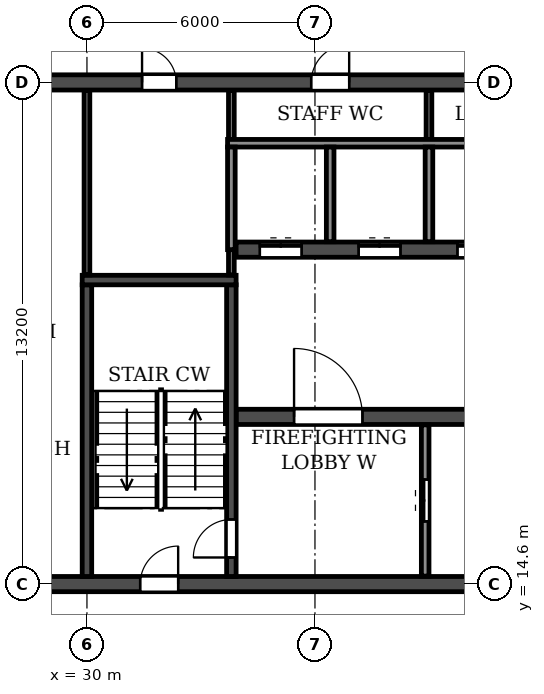
"""IFC4 building model, lengths in metres.
Left out: names, types, materials, properties, quantities, classifications, styles, units other than length and angle.
Written with IfcOpenShell. Run it as: python <this file> out.ifc"""

import sys

from ifc_helpers import new_model, si_unit, direction, frame, frame_2d, origin, place, context, subcontext, project, spatial, rectangle, extrude, element, fill, save


model = new_model("IFC4")
c1 = context("Model", 3, precision=1e-05, world=origin(), true_north=direction((0.0, 1.0)))
c2 = subcontext(c1, "Body", "Model", "MODEL_VIEW")
j1 = project(units=[si_unit("LENGTHUNIT", "METRE"), si_unit("PLANEANGLEUNIT", "RADIAN")], contexts=[c1])
p1 = place(None, origin())
s1 = spatial("IfcSite", under=j1, at=p1, CompositionType="ELEMENT")
p2 = place(p1, origin())
s2 = spatial("IfcBuilding", under=s1, at=p2, CompositionType="ELEMENT")
p3 = place(p2, frame((0.0, 0.0, 171.9)))
s3 = spatial("IfcBuildingStorey", under=s2, at=p3, CompositionType="ELEMENT", Elevation=171.9)
p4 = place(p3, frame((18.2, 14.6, 0.0), z_axis=(0.0, 0.0, 1.0), x_axis=(1.0, 0.0, 0.0)))
e1 = element("IfcWall", 1, at=p4, inside=s3, PredefinedType="SOLIDWALL", context=c2, shape_type="SweptSolid", body=[
    extrude(rectangle(XDim=65.6, YDim=0.4, at=frame_2d((32.8, 0.0))), origin(), (0.0, 0.0, 1.0), 3.08),
])
p5 = place(p4, frame((0.7, 0.0, 0.0)))
e2 = element("IfcOpeningElement", 2, at=p5, cuts=e1, PredefinedType="OPENING", context=c2, shape_type="SweptSolid", body=[
    extrude(rectangle(XDim=1.0, YDim=2.1, at=frame_2d((0.5, 1.05))), frame((0.0, 0.21, 0.0), z_axis=(0.0, -1.0, 0.0), x_axis=(1.0, 0.0, 0.0)), (0.0, 0.0, 1.0), 0.42),
])
p6 = place(p4, frame((8.6, 0.0, 0.0)))
e3 = element("IfcOpeningElement", 3, at=p6, cuts=e1, PredefinedType="OPENING", context=c2, shape_type="SweptSolid", body=[
    extrude(rectangle(XDim=1.0, YDim=2.1, at=frame_2d((0.5, 1.05))), frame((0.0, 0.21, 0.0), z_axis=(0.0, -1.0, 0.0), x_axis=(1.0, 0.0, 0.0)), (0.0, 0.0, 1.0), 0.42),
])
p7 = place(p4, frame((13.2, 0.0, 0.0)))
e4 = element("IfcOpeningElement", 4, at=p7, cuts=e1, PredefinedType="OPENING", context=c2, shape_type="SweptSolid", body=[
    extrude(rectangle(XDim=1.0, YDim=2.1, at=frame_2d((0.5, 1.05))), frame((0.0, 0.21, 0.0), z_axis=(0.0, -1.0, 0.0), x_axis=(1.0, 0.0, 0.0)), (0.0, 0.0, 1.0), 0.42),
])
p8 = place(p4, frame((25.8, 0.0, 0.0)))
e5 = element("IfcOpeningElement", 5, at=p8, cuts=e1, PredefinedType="OPENING", context=c2, shape_type="SweptSolid", body=[
    extrude(rectangle(XDim=1.0, YDim=2.1, at=frame_2d((0.5, 1.05))), frame((0.0, 0.21, 0.0), z_axis=(0.0, -1.0, 0.0), x_axis=(1.0, 0.0, 0.0)), (0.0, 0.0, 1.0), 0.42),
])
p9 = place(p4, frame((29.7, 0.0, 0.0)))
e6 = element("IfcOpeningElement", 6, at=p9, cuts=e1, PredefinedType="OPENING", context=c2, shape_type="SweptSolid", body=[
    extrude(rectangle(XDim=1.0, YDim=2.1, at=frame_2d((0.5, 1.05))), frame((0.0, 0.21, 0.0), z_axis=(0.0, -1.0, 0.0), x_axis=(1.0, 0.0, 0.0)), (0.0, 0.0, 1.0), 0.42),
])
p10 = place(p4, frame((32.3, 0.0, 0.0)))
e7 = element("IfcOpeningElement", 7, at=p10, cuts=e1, PredefinedType="OPENING", context=c2, shape_type="SweptSolid", body=[
    extrude(rectangle(XDim=1.0, YDim=2.1, at=frame_2d((0.5, 1.05))), frame((0.0, 0.21, 0.0), z_axis=(0.0, -1.0, 0.0), x_axis=(1.0, 0.0, 0.0)), (0.0, 0.0, 1.0), 0.42),
])
p11 = place(p4, frame((37.5, 0.0, 0.0)))
e8 = element("IfcOpeningElement", 8, at=p11, cuts=e1, PredefinedType="OPENING", context=c2, shape_type="SweptSolid", body=[
    extrude(rectangle(XDim=1.0, YDim=2.1, at=frame_2d((0.5, 1.05))), frame((0.0, 0.21, 0.0), z_axis=(0.0, -1.0, 0.0), x_axis=(1.0, 0.0, 0.0)), (0.0, 0.0, 1.0), 0.42),
])
p12 = place(p4, frame((51.4, 0.0, 0.0)))
e9 = element("IfcOpeningElement", 9, at=p12, cuts=e1, PredefinedType="OPENING", context=c2, shape_type="SweptSolid", body=[
    extrude(rectangle(XDim=1.0, YDim=2.1, at=frame_2d((0.5, 1.05))), frame((0.0, 0.21, 0.0), z_axis=(0.0, -1.0, 0.0), x_axis=(1.0, 0.0, 0.0)), (0.0, 0.0, 1.0), 0.42),
])
p13 = place(p4, frame((56.0, 0.0, 0.0)))
e10 = element("IfcOpeningElement", 10, at=p13, cuts=e1, PredefinedType="OPENING", context=c2, shape_type="SweptSolid", body=[
    extrude(rectangle(XDim=1.0, YDim=2.1, at=frame_2d((0.5, 1.05))), frame((0.0, 0.21, 0.0), z_axis=(0.0, -1.0, 0.0), x_axis=(1.0, 0.0, 0.0)), (0.0, 0.0, 1.0), 0.42),
])
p14 = place(p4, frame((63.9, 0.0, 0.0)))
e11 = element("IfcOpeningElement", 11, at=p14, cuts=e1, PredefinedType="OPENING", context=c2, shape_type="SweptSolid", body=[
    extrude(rectangle(XDim=1.0, YDim=2.1, at=frame_2d((0.5, 1.05))), frame((0.0, 0.21, 0.0), z_axis=(0.0, -1.0, 0.0), x_axis=(1.0, 0.0, 0.0)), (0.0, 0.0, 1.0), 0.42),
])
p15 = place(p3, frame((18.2, 27.8, 0.0), z_axis=(0.0, 0.0, 1.0), x_axis=(1.0, 0.0, 0.0)))
e12 = element("IfcWall", 12, at=p15, inside=s3, PredefinedType="SOLIDWALL", context=c2, shape_type="SweptSolid", body=[
    extrude(rectangle(XDim=65.6, YDim=0.4, at=frame_2d((32.8, 0.0))), origin(), (0.0, 0.0, 1.0), 3.08),
])
p16 = place(p15, frame((0.7, 0.0, 0.0)))
e13 = element("IfcOpeningElement", 13, at=p16, cuts=e12, PredefinedType="OPENING", context=c2, shape_type="SweptSolid", body=[
    extrude(rectangle(XDim=1.0, YDim=2.1, at=frame_2d((0.5, 1.05))), frame((0.0, 0.21, 0.0), z_axis=(0.0, -1.0, 0.0), x_axis=(1.0, 0.0, 0.0)), (0.0, 0.0, 1.0), 0.42),
])
p17 = place(p15, frame((4.05, 0.0, 0.0)))
e14 = element("IfcOpeningElement", 14, at=p17, cuts=e12, PredefinedType="OPENING", context=c2, shape_type="SweptSolid", body=[
    extrude(rectangle(XDim=0.9, YDim=2.1, at=frame_2d((0.45, 1.05))), frame((0.0, 0.21, 0.0), z_axis=(0.0, -1.0, 0.0), x_axis=(1.0, 0.0, 0.0)), (0.0, 0.0, 1.0), 0.42),
])
p18 = place(p15, frame((13.25, 0.0, 0.0)))
e15 = element("IfcOpeningElement", 15, at=p18, cuts=e12, PredefinedType="OPENING", context=c2, shape_type="SweptSolid", body=[
    extrude(rectangle(XDim=0.9, YDim=2.1, at=frame_2d((0.45, 1.05))), frame((0.0, 0.21, 0.0), z_axis=(0.0, -1.0, 0.0), x_axis=(1.0, 0.0, 0.0)), (0.0, 0.0, 1.0), 0.42),
])
p19 = place(p15, frame((17.7, 0.0, 0.0)))
e16 = element("IfcOpeningElement", 16, at=p19, cuts=e12, PredefinedType="OPENING", context=c2, shape_type="SweptSolid", body=[
    extrude(rectangle(XDim=1.0, YDim=2.1, at=frame_2d((0.5, 1.05))), frame((0.0, 0.21, 0.0), z_axis=(0.0, -1.0, 0.0), x_axis=(1.0, 0.0, 0.0)), (0.0, 0.0, 1.0), 0.42),
])
p20 = place(p15, frame((22.9, 0.0, 0.0)))
e17 = element("IfcOpeningElement", 17, at=p20, cuts=e12, PredefinedType="OPENING", context=c2, shape_type="SweptSolid", body=[
    extrude(rectangle(XDim=1.0, YDim=2.1, at=frame_2d((0.5, 1.05))), frame((0.0, 0.21, 0.0), z_axis=(0.0, -1.0, 0.0), x_axis=(1.0, 0.0, 0.0)), (0.0, 0.0, 1.0), 0.42),
])
p21 = place(p15, frame((29.4, 0.0, 0.0)))
e18 = element("IfcOpeningElement", 18, at=p21, cuts=e12, PredefinedType="OPENING", context=c2, shape_type="SweptSolid", body=[
    extrude(rectangle(XDim=1.0, YDim=2.1, at=frame_2d((0.5, 1.05))), frame((0.0, 0.21, 0.0), z_axis=(0.0, -1.0, 0.0), x_axis=(1.0, 0.0, 0.0)), (0.0, 0.0, 1.0), 0.42),
])
p22 = place(p15, frame((32.3, 0.0, 0.0)))
e19 = element("IfcOpeningElement", 19, at=p22, cuts=e12, PredefinedType="OPENING", context=c2, shape_type="SweptSolid", body=[
    extrude(rectangle(XDim=1.0, YDim=2.1, at=frame_2d((0.5, 1.05))), frame((0.0, 0.21, 0.0), z_axis=(0.0, -1.0, 0.0), x_axis=(1.0, 0.0, 0.0)), (0.0, 0.0, 1.0), 0.42),
])
p23 = place(p15, frame((36.5, 0.0, 0.0)))
e20 = element("IfcOpeningElement", 20, at=p23, cuts=e12, PredefinedType="OPENING", context=c2, shape_type="SweptSolid", body=[
    extrude(rectangle(XDim=1.0, YDim=2.1, at=frame_2d((0.5, 1.05))), frame((0.0, 0.21, 0.0), z_axis=(0.0, -1.0, 0.0), x_axis=(1.0, 0.0, 0.0)), (0.0, 0.0, 1.0), 0.42),
])
p24 = place(p15, frame((41.7, 0.0, 0.0)))
e21 = element("IfcOpeningElement", 21, at=p24, cuts=e12, PredefinedType="OPENING", context=c2, shape_type="SweptSolid", body=[
    extrude(rectangle(XDim=1.0, YDim=2.1, at=frame_2d((0.5, 1.05))), frame((0.0, 0.21, 0.0), z_axis=(0.0, -1.0, 0.0), x_axis=(1.0, 0.0, 0.0)), (0.0, 0.0, 1.0), 0.42),
])
p25 = place(p15, frame((45.6, 0.0, 0.0)))
e22 = element("IfcOpeningElement", 22, at=p25, cuts=e12, PredefinedType="OPENING", context=c2, shape_type="SweptSolid", body=[
    extrude(rectangle(XDim=1.0, YDim=2.1, at=frame_2d((0.5, 1.05))), frame((0.0, 0.21, 0.0), z_axis=(0.0, -1.0, 0.0), x_axis=(1.0, 0.0, 0.0)), (0.0, 0.0, 1.0), 0.42),
])
p26 = place(p15, frame((48.2, 0.0, 0.0)))
e23 = element("IfcOpeningElement", 23, at=p26, cuts=e12, PredefinedType="OPENING", context=c2, shape_type="SweptSolid", body=[
    extrude(rectangle(XDim=1.0, YDim=2.1, at=frame_2d((0.5, 1.05))), frame((0.0, 0.21, 0.0), z_axis=(0.0, -1.0, 0.0), x_axis=(1.0, 0.0, 0.0)), (0.0, 0.0, 1.0), 0.42),
])
p27 = place(p15, frame((51.45, 0.0, 0.0)))
e24 = element("IfcOpeningElement", 24, at=p27, cuts=e12, PredefinedType="OPENING", context=c2, shape_type="SweptSolid", body=[
    extrude(rectangle(XDim=0.9, YDim=2.1, at=frame_2d((0.45, 1.05))), frame((0.0, 0.21, 0.0), z_axis=(0.0, -1.0, 0.0), x_axis=(1.0, 0.0, 0.0)), (0.0, 0.0, 1.0), 0.42),
])
p28 = place(p15, frame((60.65, 0.0, 0.0)))
e25 = element("IfcOpeningElement", 25, at=p28, cuts=e12, PredefinedType="OPENING", context=c2, shape_type="SweptSolid", body=[
    extrude(rectangle(XDim=0.9, YDim=2.1, at=frame_2d((0.45, 1.05))), frame((0.0, 0.21, 0.0), z_axis=(0.0, -1.0, 0.0), x_axis=(1.0, 0.0, 0.0)), (0.0, 0.0, 1.0), 0.42),
])
p29 = place(p15, frame((63.9, 0.0, 0.0)))
e26 = element("IfcOpeningElement", 26, at=p29, cuts=e12, PredefinedType="OPENING", context=c2, shape_type="SweptSolid", body=[
    extrude(rectangle(XDim=1.0, YDim=2.1, at=frame_2d((0.5, 1.05))), frame((0.0, 0.21, 0.0), z_axis=(0.0, -1.0, 0.0), x_axis=(1.0, 0.0, 0.0)), (0.0, 0.0, 1.0), 0.42),
])
p30 = place(p3, frame((33.925, 19.0, 0.0), z_axis=(0.0, 0.0, 1.0), x_axis=(1.0, 0.0, 0.0)))
e27 = element("IfcWall", 27, at=p30, inside=s3, PredefinedType="SOLIDWALL", context=c2, shape_type="SweptSolid", body=[
    extrude(rectangle(XDim=34.15, YDim=0.4, at=frame_2d((17.075, 0.0))), origin(), (0.0, 0.0, 1.0), 3.08),
])
p31 = place(p30, frame((16.175, 0.0, 0.0)))
e28 = element("IfcOpeningElement", 28, at=p31, cuts=e27, PredefinedType="OPENING", context=c2, shape_type="SweptSolid", body=[
    extrude(rectangle(XDim=1.8, YDim=2.1, at=frame_2d((0.9, 1.05))), frame((0.0, 0.21, 0.0), z_axis=(0.0, -1.0, 0.0), x_axis=(1.0, 0.0, 0.0)), (0.0, 0.0, 1.0), 0.42),
])
p32 = place(p30, frame((1.525, 0.0, 0.0)))
e29 = element("IfcOpeningElement", 29, at=p32, cuts=e27, PredefinedType="OPENING", context=c2, shape_type="SweptSolid", body=[
    extrude(rectangle(XDim=1.8, YDim=2.1, at=frame_2d((0.9, 1.05))), frame((0.0, 0.21, 0.0), z_axis=(0.0, -1.0, 0.0), x_axis=(1.0, 0.0, 0.0)), (0.0, 0.0, 1.0), 0.42),
])
p33 = place(p30, frame((30.825, 0.0, 0.0)))
e30 = element("IfcOpeningElement", 30, at=p33, cuts=e27, PredefinedType="OPENING", context=c2, shape_type="SweptSolid", body=[
    extrude(rectangle(XDim=1.8, YDim=2.1, at=frame_2d((0.9, 1.05))), frame((0.0, 0.21, 0.0), z_axis=(0.0, -1.0, 0.0), x_axis=(1.0, 0.0, 0.0)), (0.0, 0.0, 1.0), 0.42),
])
p34 = place(p3, frame((33.925, 23.4, 0.0), z_axis=(0.0, 0.0, 1.0), x_axis=(1.0, 0.0, 0.0)))
e31 = element("IfcWall", 31, at=p34, inside=s3, PredefinedType="SOLIDWALL", context=c2, shape_type="SweptSolid", body=[
    extrude(rectangle(XDim=34.15, YDim=0.4, at=frame_2d((17.075, 0.0))), origin(), (0.0, 0.0, 1.0), 3.08),
])
p35 = place(p34, frame((16.175, 0.0, 0.0)))
e32 = element("IfcOpeningElement", 32, at=p35, cuts=e31, PredefinedType="OPENING", context=c2, shape_type="SweptSolid", body=[
    extrude(rectangle(XDim=1.8, YDim=2.1, at=frame_2d((0.9, 1.05))), frame((0.0, 0.21, 0.0), z_axis=(0.0, -1.0, 0.0), x_axis=(1.0, 0.0, 0.0)), (0.0, 0.0, 1.0), 0.42),
])
p36 = place(p34, frame((0.625, 0.0, 0.0)))
e33 = element("IfcOpeningElement", 33, at=p36, cuts=e31, PredefinedType="OPENING", context=c2, shape_type="SweptSolid", body=[
    extrude(rectangle(XDim=1.1, YDim=2.1, at=frame_2d((0.55, 1.05))), frame((0.0, 0.21, 0.0), z_axis=(0.0, -1.0, 0.0), x_axis=(1.0, 0.0, 0.0)), (0.0, 0.0, 1.0), 0.42),
])
p37 = place(p34, frame((3.225, 0.0, 0.0)))
e34 = element("IfcOpeningElement", 34, at=p37, cuts=e31, PredefinedType="OPENING", context=c2, shape_type="SweptSolid", body=[
    extrude(rectangle(XDim=1.1, YDim=2.1, at=frame_2d((0.55, 1.05))), frame((0.0, 0.21, 0.0), z_axis=(0.0, -1.0, 0.0), x_axis=(1.0, 0.0, 0.0)), (0.0, 0.0, 1.0), 0.42),
])
p38 = place(p34, frame((5.825, 0.0, 0.0)))
e35 = element("IfcOpeningElement", 35, at=p38, cuts=e31, PredefinedType="OPENING", context=c2, shape_type="SweptSolid", body=[
    extrude(rectangle(XDim=1.1, YDim=2.1, at=frame_2d((0.55, 1.05))), frame((0.0, 0.21, 0.0), z_axis=(0.0, -1.0, 0.0), x_axis=(1.0, 0.0, 0.0)), (0.0, 0.0, 1.0), 0.42),
])
p39 = place(p34, frame((8.425, 0.0, 0.0)))
e36 = element("IfcOpeningElement", 36, at=p39, cuts=e31, PredefinedType="OPENING", context=c2, shape_type="SweptSolid", body=[
    extrude(rectangle(XDim=1.1, YDim=2.1, at=frame_2d((0.55, 1.05))), frame((0.0, 0.21, 0.0), z_axis=(0.0, -1.0, 0.0), x_axis=(1.0, 0.0, 0.0)), (0.0, 0.0, 1.0), 0.42),
])
p40 = place(p34, frame((11.025, 0.0, 0.0)))
e37 = element("IfcOpeningElement", 37, at=p40, cuts=e31, PredefinedType="OPENING", context=c2, shape_type="SweptSolid", body=[
    extrude(rectangle(XDim=1.1, YDim=2.1, at=frame_2d((0.55, 1.05))), frame((0.0, 0.21, 0.0), z_axis=(0.0, -1.0, 0.0), x_axis=(1.0, 0.0, 0.0)), (0.0, 0.0, 1.0), 0.42),
])
p41 = place(p34, frame((13.625, 0.0, 0.0)))
e38 = element("IfcOpeningElement", 38, at=p41, cuts=e31, PredefinedType="OPENING", context=c2, shape_type="SweptSolid", body=[
    extrude(rectangle(XDim=1.1, YDim=2.1, at=frame_2d((0.55, 1.05))), frame((0.0, 0.21, 0.0), z_axis=(0.0, -1.0, 0.0), x_axis=(1.0, 0.0, 0.0)), (0.0, 0.0, 1.0), 0.42),
])
p42 = place(p34, frame((27.225, 0.0, 0.0)))
e39 = element("IfcOpeningElement", 39, at=p42, cuts=e31, PredefinedType="OPENING", context=c2, shape_type="SweptSolid", body=[
    extrude(rectangle(XDim=1.1, YDim=2.1, at=frame_2d((0.55, 1.05))), frame((0.0, 0.21, 0.0), z_axis=(0.0, -1.0, 0.0), x_axis=(1.0, 0.0, 0.0)), (0.0, 0.0, 1.0), 0.42),
])
p43 = place(p3, frame((30.0, 14.8, 0.0), z_axis=(0.0, 0.0, 1.0), x_axis=(0.0, 1.0, 0.0)))
e40 = element("IfcWall", 40, at=p43, inside=s3, PredefinedType="SOLIDWALL", context=c2, shape_type="SweptSolid", body=[
    extrude(rectangle(XDim=7.675, YDim=0.25, at=frame_2d((3.837, 0.0))), origin(), (0.0, 0.0, 1.0), 3.08),
])
p44 = place(p3, frame((33.8, 14.8, 0.0), z_axis=(0.0, 0.0, 1.0), x_axis=(0.0, 1.0, 0.0)))
e41 = element("IfcWall", 41, at=p44, inside=s3, PredefinedType="SOLIDWALL", context=c2, shape_type="SweptSolid", body=[
    extrude(rectangle(XDim=7.675, YDim=0.25, at=frame_2d((3.837, 0.0))), origin(), (0.0, 0.0, 1.0), 3.08),
])
p45 = place(p44, frame((0.5, 0.0, 0.0)))
e42 = element("IfcOpeningElement", 42, at=p45, cuts=e41, PredefinedType="OPENING", context=c2, shape_type="SweptSolid", body=[
    extrude(rectangle(XDim=1.0, YDim=2.1, at=frame_2d((0.5, 1.05))), frame((0.0, 0.135, 0.0), z_axis=(0.0, -1.0, 0.0), x_axis=(1.0, 0.0, 0.0)), (0.0, 0.0, 1.0), 0.27),
])
p46 = place(p3, frame((29.875, 22.6, 0.0), z_axis=(0.0, 0.0, 1.0), x_axis=(1.0, 0.0, 0.0)))
e43 = element("IfcWall", 43, at=p46, inside=s3, PredefinedType="SOLIDWALL", context=c2, shape_type="SweptSolid", body=[
    extrude(rectangle(XDim=4.05, YDim=0.25, at=frame_2d((2.025, 0.0))), origin(), (0.0, 0.0, 1.0), 3.08),
])
p47 = place(p3, frame((39.0, 26.3, 0.0), z_axis=(0.0, 0.0, 1.0), x_axis=(0.0, 1.0, 0.0)))
e44 = element("IfcWall", 44, at=p47, inside=s3, PredefinedType="PARTITIONING", context=c2, shape_type="SweptSolid", body=[
    extrude(rectangle(XDim=1.29, YDim=0.15, at=frame_2d((0.645, 0.0))), origin(), (0.0, 0.0, 1.0), 3.08),
])
p48 = place(p3, frame((30.0, 22.735, 0.0), z_axis=(0.0, 0.0, 1.0), x_axis=(0.0, 1.0, 0.0)))
e45 = element("IfcWall", 45, at=p48, inside=s3, PredefinedType="PARTITIONING", context=c2, shape_type="SweptSolid", body=[
    extrude(rectangle(XDim=4.855, YDim=0.15, at=frame_2d((2.427, 0.0))), origin(), (0.0, 0.0, 1.0), 3.08),
])
p49 = place(p3, frame((33.8, 22.735, 0.0), z_axis=(0.0, 0.0, 1.0), x_axis=(0.0, 1.0, 0.0)))
e46 = element("IfcWall", 46, at=p49, inside=s3, PredefinedType="PARTITIONING", context=c2, shape_type="SweptSolid", body=[
    extrude(rectangle(XDim=0.665, YDim=0.15, at=frame_2d((0.333, 0.0))), origin(), (0.0, 0.0, 1.0), 3.08),
])
p50 = place(p3, frame((33.8, 26.3, 0.0), z_axis=(0.0, 0.0, 1.0), x_axis=(0.0, 1.0, 0.0)))
e47 = element("IfcWall", 47, at=p50, inside=s3, PredefinedType="PARTITIONING", context=c2, shape_type="SweptSolid", body=[
    extrude(rectangle(XDim=1.29, YDim=0.15, at=frame_2d((0.645, 0.0))), origin(), (0.0, 0.0, 1.0), 3.08),
])
p51 = place(p3, frame((33.7, 26.2, 0.0), z_axis=(0.0, 0.0, 1.0), x_axis=(1.0, 0.0, 0.0)))
e48 = element("IfcWall", 48, at=p51, inside=s3, PredefinedType="PARTITIONING", context=c2, shape_type="SweptSolid", body=[
    extrude(rectangle(XDim=10.4, YDim=0.2, at=frame_2d((5.2, 0.0))), origin(), (0.0, 0.0, 1.0), 3.08),
])
p52 = place(p3, frame((33.8, 23.4, 0.0), z_axis=(0.0, 0.0, 1.0), x_axis=(0.0, 1.0, 0.0)))
e49 = element("IfcWall", 49, at=p52, inside=s3, PredefinedType="PARTITIONING", context=c2, shape_type="SweptSolid", body=[
    extrude(rectangle(XDim=2.7, YDim=0.2, at=frame_2d((1.35, 0.0))), origin(), (0.0, 0.0, 1.0), 3.08),
])
p53 = place(p3, frame((36.4, 23.61, 0.0), z_axis=(0.0, 0.0, 1.0), x_axis=(0.0, 1.0, 0.0)))
e50 = element("IfcWall", 50, at=p53, inside=s3, PredefinedType="PARTITIONING", context=c2, shape_type="SweptSolid", body=[
    extrude(rectangle(XDim=2.49, YDim=0.2, at=frame_2d((1.245, 0.0))), origin(), (0.0, 0.0, 1.0), 3.08),
])
p54 = place(p3, frame((38.9, 14.81, 0.0), z_axis=(0.0, 0.0, 1.0), x_axis=(0.0, 1.0, 0.0)))
e51 = element("IfcWall", 51, at=p54, inside=s3, PredefinedType="PARTITIONING", context=c2, shape_type="SweptSolid", body=[
    extrude(rectangle(XDim=3.98, YDim=0.2, at=frame_2d((1.99, 0.0))), origin(), (0.0, 0.0, 1.0), 3.08),
])
p55 = place(p54, frame((1.44, 0.0, 0.0)))
e52 = element("IfcOpeningElement", 52, at=p55, cuts=e51, PredefinedType="OPENING", context=c2, shape_type="SweptSolid", body=[
    extrude(rectangle(XDim=1.1, YDim=2.1, at=frame_2d((0.55, 1.05))), frame((0.0, 0.11, 0.0), z_axis=(0.0, -1.0, 0.0), x_axis=(1.0, 0.0, 0.0)), (0.0, 0.0, 1.0), 0.22),
])
p56 = place(p3, frame((39.0, 23.61, 0.0), z_axis=(0.0, 0.0, 1.0), x_axis=(0.0, 1.0, 0.0)))
e53 = element("IfcWall", 53, at=p56, inside=s3, PredefinedType="PARTITIONING", context=c2, shape_type="SweptSolid", body=[
    extrude(rectangle(XDim=2.49, YDim=0.2, at=frame_2d((1.245, 0.0))), origin(), (0.0, 0.0, 1.0), 3.08),
])
p57 = place(p18, origin())
e54 = element("IfcDoor", 54, at=p57, inside=s3, OperationType="SINGLE_SWING_LEFT", PredefinedType="DOOR", context=c2, shape_type="SweptSolid", body=[
    extrude(rectangle(XDim=0.9, YDim=2.1, at=frame_2d((0.45, 1.05))), frame((0.0, 0.025, 0.0), z_axis=(0.0, -1.0, 0.0), x_axis=(1.0, 0.0, 0.0)), (0.0, 0.0, 1.0), 0.05),
])
fill(e15, e54)
p58 = place(p19, origin())
e55 = element("IfcDoor", 55, at=p58, inside=s3, OperationType="SINGLE_SWING_RIGHT", PredefinedType="DOOR", context=c2, shape_type="SweptSolid", body=[
    extrude(rectangle(XDim=1.0, YDim=2.1, at=frame_2d((0.5, 1.05))), frame((0.0, 0.025, 0.0), z_axis=(0.0, -1.0, 0.0), x_axis=(1.0, 0.0, 0.0)), (0.0, 0.0, 1.0), 0.05),
])
fill(e16, e55)
p59 = place(p7, origin())
e56 = element("IfcDoor", 56, at=p59, inside=s3, OperationType="SINGLE_SWING_RIGHT", PredefinedType="DOOR", context=c2, shape_type="SweptSolid", body=[
    extrude(rectangle(XDim=1.0, YDim=2.1, at=frame_2d((0.5, 1.05))), frame((0.0, 0.025, 0.0), z_axis=(0.0, -1.0, 0.0), x_axis=(1.0, 0.0, 0.0)), (0.0, 0.0, 1.0), 0.05),
])
fill(e4, e56)
p60 = place(p45, origin())
e57 = element("IfcDoor", 57, at=p60, inside=s3, OperationType="SINGLE_SWING_LEFT", PredefinedType="DOOR", context=c2, shape_type="SweptSolid", body=[
    extrude(rectangle(XDim=1.0, YDim=2.1, at=frame_2d((0.5, 1.05))), frame((0.0, 0.025, 0.0), z_axis=(0.0, -1.0, 0.0), x_axis=(1.0, 0.0, 0.0)), (0.0, 0.0, 1.0), 0.05),
])
fill(e42, e57)
p61 = place(p55, origin())
e58 = element("IfcDoor", 58, at=p61, inside=s3, OperationType="DOUBLE_DOOR_SLIDING", PredefinedType="DOOR", context=c2, shape_type="SweptSolid", body=[
    extrude(rectangle(XDim=1.1, YDim=2.1, at=frame_2d((0.55, 1.05))), frame((0.0, 0.025, 0.0), z_axis=(0.0, -1.0, 0.0), x_axis=(1.0, 0.0, 0.0)), (0.0, 0.0, 1.0), 0.05),
])
fill(e52, e58)
p62 = place(p36, origin())
e59 = element("IfcDoor", 59, at=p62, inside=s3, OperationType="DOUBLE_DOOR_SLIDING", PredefinedType="DOOR", context=c2, shape_type="SweptSolid", body=[
    extrude(rectangle(XDim=1.1, YDim=2.1, at=frame_2d((0.55, 1.05))), frame((0.0, 0.025, 0.0), z_axis=(0.0, -1.0, 0.0), x_axis=(1.0, 0.0, 0.0)), (0.0, 0.0, 1.0), 0.05),
])
fill(e33, e59)
p63 = place(p32, origin())
e60 = element("IfcDoor", 60, at=p63, inside=s3, OperationType="DOUBLE_DOOR_SINGLE_SWING", PredefinedType="DOOR", context=c2, shape_type="SweptSolid", body=[
    extrude(rectangle(XDim=1.8, YDim=2.1, at=frame_2d((0.9, 1.05))), frame((0.0, 0.025, 0.0), z_axis=(0.0, -1.0, 0.0), x_axis=(1.0, 0.0, 0.0)), (0.0, 0.0, 1.0), 0.05),
])
fill(e29, e60)
p64 = place(p37, origin())
e61 = element("IfcDoor", 61, at=p64, inside=s3, OperationType="DOUBLE_DOOR_SLIDING", PredefinedType="DOOR", context=c2, shape_type="SweptSolid", body=[
    extrude(rectangle(XDim=1.1, YDim=2.1, at=frame_2d((0.55, 1.05))), frame((0.0, 0.025, 0.0), z_axis=(0.0, -1.0, 0.0), x_axis=(1.0, 0.0, 0.0)), (0.0, 0.0, 1.0), 0.05),
])
fill(e34, e61)
p65 = place(p38, origin())
e62 = element("IfcDoor", 62, at=p65, inside=s3, OperationType="DOUBLE_DOOR_SLIDING", PredefinedType="DOOR", context=c2, shape_type="SweptSolid", body=[
    extrude(rectangle(XDim=1.1, YDim=2.1, at=frame_2d((0.55, 1.05))), frame((0.0, 0.025, 0.0), z_axis=(0.0, -1.0, 0.0), x_axis=(1.0, 0.0, 0.0)), (0.0, 0.0, 1.0), 0.05),
])
fill(e35, e62)
save(model, sys.argv[1])
